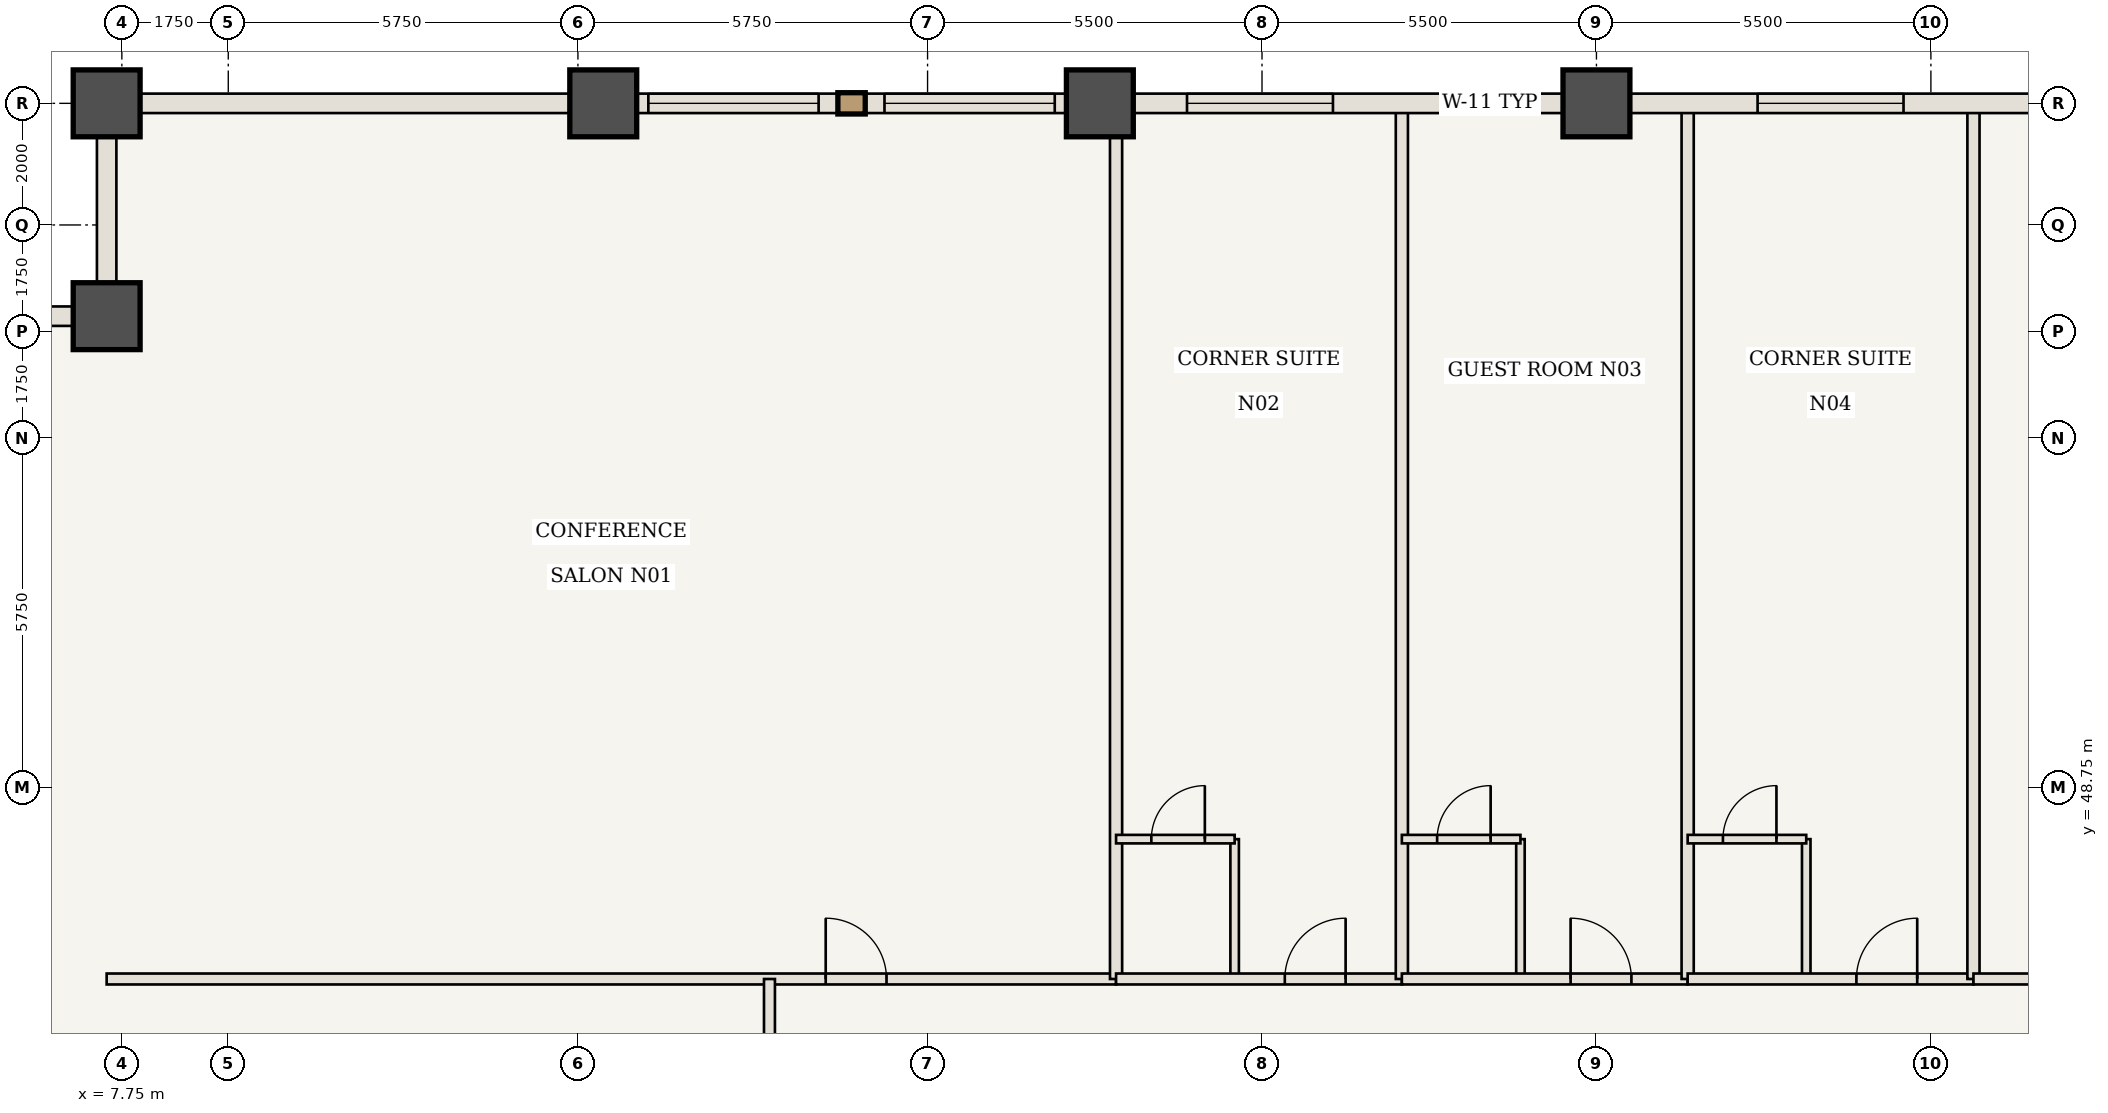
"""IFC4 building model, lengths in metres.
Left out: names, types, materials, properties, quantities, classifications, styles, units other than length and angle.
Written with IfcOpenShell. Run it as: python <this file> out.ifc"""

import sys

from ifc_helpers import new_model, si_unit, direction, frame, frame_2d, origin, origin_2d, place, context, subcontext, project, spatial, rectangle, extrude, element, fill, save


model = new_model("IFC4")
c1 = context("Model", 3, precision=1e-05, world=origin(), true_north=direction((0.0, 1.0)))
c2 = subcontext(c1, "Body", "Model", "MODEL_VIEW")
j1 = project(units=[si_unit("LENGTHUNIT", "METRE"), si_unit("PLANEANGLEUNIT", "RADIAN")], contexts=[c1])
p1 = place(None, origin())
s1 = spatial("IfcSite", under=j1, at=p1, CompositionType="ELEMENT")
p2 = place(p1, origin())
s2 = spatial("IfcBuilding", under=s1, at=p2, CompositionType="ELEMENT")
p3 = place(p2, frame((0.0, 0.0, 38.85)))
s3 = spatial("IfcBuildingStorey", under=s2, at=p3, CompositionType="ELEMENT", Elevation=38.85)
for number, where, z_axis, x_axis in (
    (1, (7.5, 60.0, 0.0), (0.0, 0.0, 1.0), (1.0, 0.0, 0.0)),
    (2, (7.5, 56.5, 0.0), (0.0, 0.0, 1.0), (1.0, 0.0, 0.0)),
    (3, (15.667, 60.0, 0.0), (0.0, 0.0, 1.0), (1.0, 0.0, 0.0)),
    (4, (23.833, 60.0, 0.0), (0.0, 0.0, 1.0), (1.0, 0.0, 0.0)),
    (5, (32.0, 60.0, 0.0), (0.0, 0.0, 1.0), (1.0, 0.0, 0.0)),
):
    element("IfcColumn", number, at=place(p3, frame(where, z_axis=z_axis, x_axis=x_axis)), inside=s3, PredefinedType="COLUMN", context=c2, shape_type="SweptSolid", body=[
        extrude(rectangle(XDim=1.1, YDim=1.1, at=origin_2d()), origin(), (0.0, 0.0, 1.0), 3.5),
    ])
p4 = place(p3, frame((7.5, 45.6, 0.0), z_axis=(0.0, 0.0, 1.0), x_axis=(1.0, 0.0, 0.0)))
e6 = element("IfcWall", 6, at=p4, inside=s3, PredefinedType="STANDARD", context=c2, shape_type="SweptSolid", body=[
    extrude(rectangle(XDim=16.6, YDim=0.18, at=frame_2d((8.3, 0.0))), origin(), (0.0, 0.0, 1.0), 3.08),
])
p5 = place(p4, frame((11.825, 0.0, 0.0)))
e7 = element("IfcOpeningElement", 7, at=p5, cuts=e6, PredefinedType="OPENING", context=c2, shape_type="SweptSolid", body=[
    extrude(rectangle(XDim=1.0, YDim=2.15, at=frame_2d((0.5, 1.075))), frame((0.0, 0.1, 0.0), z_axis=(0.0, -1.0, 0.0), x_axis=(1.0, 0.0, 0.0)), (0.0, 0.0, 1.0), 0.2),
])
p6 = place(p3, frame((24.1, 45.6, 0.0), z_axis=(0.0, 0.0, 1.0), x_axis=(0.0, 1.0, 0.0)))
e8 = element("IfcWall", 8, at=p6, inside=s3, PredefinedType="STANDARD", context=c2, shape_type="SweptSolid", body=[
    extrude(rectangle(XDim=14.34, YDim=0.2, at=frame_2d((7.17, 0.0))), origin(), (0.0, 0.0, 1.0), 3.08),
])
p7 = place(p3, frame((26.05, 45.6, 0.0), z_axis=(0.0, 0.0, 1.0), x_axis=(0.0, 1.0, 0.0)))
e9 = element("IfcWall", 9, at=p7, inside=s3, PredefinedType="STANDARD", context=c2, shape_type="SweptSolid", body=[
    extrude(rectangle(XDim=2.3, YDim=0.14, at=frame_2d((1.15, 0.0))), origin(), (0.0, 0.0, 1.0), 3.08),
])
p8 = place(p3, frame((24.1, 47.9, 0.0), z_axis=(0.0, 0.0, 1.0), x_axis=(1.0, 0.0, 0.0)))
e10 = element("IfcWall", 10, at=p8, inside=s3, PredefinedType="STANDARD", context=c2, shape_type="SweptSolid", body=[
    extrude(rectangle(XDim=1.95, YDim=0.14, at=frame_2d((0.975, 0.0))), origin(), (0.0, 0.0, 1.0), 3.08),
])
p9 = place(p8, frame((0.58, 0.0, 0.0)))
e11 = element("IfcOpeningElement", 11, at=p9, cuts=e10, PredefinedType="OPENING", context=c2, shape_type="SweptSolid", body=[
    extrude(rectangle(XDim=0.88, YDim=2.1, at=frame_2d((0.44, 1.05))), frame((0.0, 0.08, 0.0), z_axis=(0.0, -1.0, 0.0), x_axis=(1.0, 0.0, 0.0)), (0.0, 0.0, 1.0), 0.16),
])
p10 = place(p3, frame((24.1, 45.6, 0.0), z_axis=(0.0, 0.0, 1.0), x_axis=(1.0, 0.0, 0.0)))
e12 = element("IfcWall", 12, at=p10, inside=s3, PredefinedType="STANDARD", context=c2, shape_type="SweptSolid", body=[
    extrude(rectangle(XDim=4.7, YDim=0.18, at=frame_2d((2.35, 0.0))), origin(), (0.0, 0.0, 1.0), 3.08),
])
p11 = place(p10, frame((2.775, 0.0, 0.0)))
e13 = element("IfcOpeningElement", 13, at=p11, cuts=e12, PredefinedType="OPENING", context=c2, shape_type="SweptSolid", body=[
    extrude(rectangle(XDim=1.0, YDim=2.15, at=frame_2d((0.5, 1.075))), frame((0.0, 0.1, 0.0), z_axis=(0.0, -1.0, 0.0), x_axis=(1.0, 0.0, 0.0)), (0.0, 0.0, 1.0), 0.2),
])
p12 = place(p3, frame((28.8, 45.6, 0.0), z_axis=(0.0, 0.0, 1.0), x_axis=(0.0, 1.0, 0.0)))
e14 = element("IfcWall", 14, at=p12, inside=s3, PredefinedType="STANDARD", context=c2, shape_type="SweptSolid", body=[
    extrude(rectangle(XDim=14.34, YDim=0.2, at=frame_2d((7.17, 0.0))), origin(), (0.0, 0.0, 1.0), 3.08),
])
p13 = place(p3, frame((30.75, 45.6, 0.0), z_axis=(0.0, 0.0, 1.0), x_axis=(0.0, 1.0, 0.0)))
e15 = element("IfcWall", 15, at=p13, inside=s3, PredefinedType="STANDARD", context=c2, shape_type="SweptSolid", body=[
    extrude(rectangle(XDim=2.3, YDim=0.14, at=frame_2d((1.15, 0.0))), origin(), (0.0, 0.0, 1.0), 3.08),
])
p14 = place(p3, frame((28.8, 47.9, 0.0), z_axis=(0.0, 0.0, 1.0), x_axis=(1.0, 0.0, 0.0)))
e16 = element("IfcWall", 16, at=p14, inside=s3, PredefinedType="STANDARD", context=c2, shape_type="SweptSolid", body=[
    extrude(rectangle(XDim=1.95, YDim=0.14, at=frame_2d((0.975, 0.0))), origin(), (0.0, 0.0, 1.0), 3.08),
])
p15 = place(p14, frame((0.58, 0.0, 0.0)))
e17 = element("IfcOpeningElement", 17, at=p15, cuts=e16, PredefinedType="OPENING", context=c2, shape_type="SweptSolid", body=[
    extrude(rectangle(XDim=0.88, YDim=2.1, at=frame_2d((0.44, 1.05))), frame((0.0, 0.08, 0.0), z_axis=(0.0, -1.0, 0.0), x_axis=(1.0, 0.0, 0.0)), (0.0, 0.0, 1.0), 0.16),
])
p16 = place(p3, frame((28.8, 45.6, 0.0), z_axis=(0.0, 0.0, 1.0), x_axis=(1.0, 0.0, 0.0)))
e18 = element("IfcWall", 18, at=p16, inside=s3, PredefinedType="STANDARD", context=c2, shape_type="SweptSolid", body=[
    extrude(rectangle(XDim=4.7, YDim=0.18, at=frame_2d((2.35, 0.0))), origin(), (0.0, 0.0, 1.0), 3.08),
])
p17 = place(p16, frame((2.775, 0.0, 0.0)))
e19 = element("IfcOpeningElement", 19, at=p17, cuts=e18, PredefinedType="OPENING", context=c2, shape_type="SweptSolid", body=[
    extrude(rectangle(XDim=1.0, YDim=2.15, at=frame_2d((0.5, 1.075))), frame((0.0, 0.1, 0.0), z_axis=(0.0, -1.0, 0.0), x_axis=(1.0, 0.0, 0.0)), (0.0, 0.0, 1.0), 0.2),
])
p18 = place(p3, frame((33.5, 45.6, 0.0), z_axis=(0.0, 0.0, 1.0), x_axis=(0.0, 1.0, 0.0)))
e20 = element("IfcWall", 20, at=p18, inside=s3, PredefinedType="STANDARD", context=c2, shape_type="SweptSolid", body=[
    extrude(rectangle(XDim=14.34, YDim=0.2, at=frame_2d((7.17, 0.0))), origin(), (0.0, 0.0, 1.0), 3.08),
])
p19 = place(p3, frame((35.45, 45.6, 0.0), z_axis=(0.0, 0.0, 1.0), x_axis=(0.0, 1.0, 0.0)))
e21 = element("IfcWall", 21, at=p19, inside=s3, PredefinedType="STANDARD", context=c2, shape_type="SweptSolid", body=[
    extrude(rectangle(XDim=2.3, YDim=0.14, at=frame_2d((1.15, 0.0))), origin(), (0.0, 0.0, 1.0), 3.08),
])
p20 = place(p3, frame((33.5, 47.9, 0.0), z_axis=(0.0, 0.0, 1.0), x_axis=(1.0, 0.0, 0.0)))
e22 = element("IfcWall", 22, at=p20, inside=s3, PredefinedType="STANDARD", context=c2, shape_type="SweptSolid", body=[
    extrude(rectangle(XDim=1.95, YDim=0.14, at=frame_2d((0.975, 0.0))), origin(), (0.0, 0.0, 1.0), 3.08),
])
p21 = place(p20, frame((0.58, 0.0, 0.0)))
e23 = element("IfcOpeningElement", 23, at=p21, cuts=e22, PredefinedType="OPENING", context=c2, shape_type="SweptSolid", body=[
    extrude(rectangle(XDim=0.88, YDim=2.1, at=frame_2d((0.44, 1.05))), frame((0.0, 0.08, 0.0), z_axis=(0.0, -1.0, 0.0), x_axis=(1.0, 0.0, 0.0)), (0.0, 0.0, 1.0), 0.16),
])
p22 = place(p3, frame((33.5, 45.6, 0.0), z_axis=(0.0, 0.0, 1.0), x_axis=(1.0, 0.0, 0.0)))
e24 = element("IfcWall", 24, at=p22, inside=s3, PredefinedType="STANDARD", context=c2, shape_type="SweptSolid", body=[
    extrude(rectangle(XDim=4.7, YDim=0.18, at=frame_2d((2.35, 0.0))), origin(), (0.0, 0.0, 1.0), 3.08),
])
p23 = place(p22, frame((2.775, 0.0, 0.0)))
e25 = element("IfcOpeningElement", 25, at=p23, cuts=e24, PredefinedType="OPENING", context=c2, shape_type="SweptSolid", body=[
    extrude(rectangle(XDim=1.0, YDim=2.15, at=frame_2d((0.5, 1.075))), frame((0.0, 0.1, 0.0), z_axis=(0.0, -1.0, 0.0), x_axis=(1.0, 0.0, 0.0)), (0.0, 0.0, 1.0), 0.2),
])
p24 = place(p3, frame((38.2, 45.6, 0.0), z_axis=(0.0, 0.0, 1.0), x_axis=(0.0, 1.0, 0.0)))
e26 = element("IfcWall", 26, at=p24, inside=s3, PredefinedType="STANDARD", context=c2, shape_type="SweptSolid", body=[
    extrude(rectangle(XDim=14.34, YDim=0.2, at=frame_2d((7.17, 0.0))), origin(), (0.0, 0.0, 1.0), 3.08),
])
p25 = place(p3, frame((38.2, 45.6, 0.0), z_axis=(0.0, 0.0, 1.0), x_axis=(1.0, 0.0, 0.0)))
e27 = element("IfcWall", 27, at=p25, inside=s3, PredefinedType="STANDARD", context=c2, shape_type="SweptSolid", body=[
    extrude(rectangle(XDim=18.3, YDim=0.18, at=frame_2d((9.15, 0.0))), origin(), (0.0, 0.0, 1.0), 3.08),
])
p26 = place(p25, frame((4.625, 0.0, 0.0)))
e28 = element("IfcOpeningElement", 28, at=p26, cuts=e27, PredefinedType="OPENING", context=c2, shape_type="SweptSolid", body=[
    extrude(rectangle(XDim=1.0, YDim=2.15, at=frame_2d((0.5, 1.075))), frame((0.0, 0.1, 0.0), z_axis=(0.0, -1.0, 0.0), x_axis=(1.0, 0.0, 0.0)), (0.0, 0.0, 1.0), 0.2),
])
p27 = place(p3, frame((18.4, 41.9, 0.0), z_axis=(0.0, 0.0, 1.0), x_axis=(0.0, 1.0, 0.0)))
e29 = element("IfcWall", 29, at=p27, inside=s3, PredefinedType="STANDARD", context=c2, shape_type="SweptSolid", body=[
    extrude(rectangle(XDim=3.7, YDim=0.18, at=frame_2d((1.85, 0.0))), origin(), (0.0, 0.0, 1.0), 3.08),
])
p28 = place(p27, frame((1.35, 0.0, 0.0)))
e30 = element("IfcOpeningElement", 30, at=p28, cuts=e29, PredefinedType="OPENING", context=c2, shape_type="SweptSolid", body=[
    extrude(rectangle(XDim=1.0, YDim=2.15, at=frame_2d((0.5, 1.075))), frame((0.0, 0.1, 0.0), z_axis=(0.0, -1.0, 0.0), x_axis=(1.0, 0.0, 0.0)), (0.0, 0.0, 1.0), 0.2),
])
p29 = place(p3, frame((7.5, 60.0, 0.0), z_axis=(0.0, 0.0, 1.0), x_axis=(1.0, 0.0, 0.0)))
e31 = element("IfcWall", 31, at=p29, inside=s3, PredefinedType="USERDEFINED", context=c2, shape_type="SweptSolid", body=[
    extrude(rectangle(XDim=8.167, YDim=0.32, at=frame_2d((4.083, 0.0))), origin(), (0.0, 0.0, 1.0), 2.28),
])
p30 = place(p3, frame((15.667, 60.0, 0.0), z_axis=(0.0, 0.0, 1.0), x_axis=(1.0, 0.0, 0.0)))
e32 = element("IfcWall", 32, at=p30, inside=s3, PredefinedType="USERDEFINED", context=c2, shape_type="SweptSolid", body=[
    extrude(rectangle(XDim=8.167, YDim=0.32, at=frame_2d((4.083, 0.0))), origin(), (0.0, 0.0, 1.0), 2.28),
])
p31 = place(p30, frame((0.742, 0.0, 0.85)))
e33 = element("IfcOpeningElement", 33, at=p31, cuts=e32, PredefinedType="OPENING", context=c2, shape_type="SweptSolid", body=[
    extrude(rectangle(XDim=2.8, YDim=1.23, at=frame_2d((1.4, 0.615))), frame((0.0, 0.17, 0.0), z_axis=(0.0, -1.0, 0.0), x_axis=(1.0, 0.0, 0.0)), (0.0, 0.0, 1.0), 0.34),
])
p32 = place(p30, frame((4.625, 0.0, 0.85)))
e34 = element("IfcOpeningElement", 34, at=p32, cuts=e32, PredefinedType="OPENING", context=c2, shape_type="SweptSolid", body=[
    extrude(rectangle(XDim=2.8, YDim=1.23, at=frame_2d((1.4, 0.615))), frame((0.0, 0.17, 0.0), z_axis=(0.0, -1.0, 0.0), x_axis=(1.0, 0.0, 0.0)), (0.0, 0.0, 1.0), 0.34),
])
p33 = place(p3, frame((23.833, 60.0, 0.0), z_axis=(0.0, 0.0, 1.0), x_axis=(1.0, 0.0, 0.0)))
e35 = element("IfcWall", 35, at=p33, inside=s3, PredefinedType="USERDEFINED", context=c2, shape_type="SweptSolid", body=[
    extrude(rectangle(XDim=8.167, YDim=0.32, at=frame_2d((4.083, 0.0))), origin(), (0.0, 0.0, 1.0), 2.28),
])
p34 = place(p33, frame((1.433, 0.0, 0.85)))
e36 = element("IfcOpeningElement", 36, at=p34, cuts=e35, PredefinedType="OPENING", context=c2, shape_type="SweptSolid", body=[
    extrude(rectangle(XDim=2.4, YDim=1.23, at=frame_2d((1.2, 0.615))), frame((0.0, 0.17, 0.0), z_axis=(0.0, -1.0, 0.0), x_axis=(1.0, 0.0, 0.0)), (0.0, 0.0, 1.0), 0.34),
])
p35 = place(p33, frame((5.617, 0.0, 0.85)))
e37 = element("IfcOpeningElement", 37, at=p35, cuts=e35, PredefinedType="OPENING", context=c2, shape_type="SweptSolid", body=[
    extrude(rectangle(XDim=1.6, YDim=1.23, at=frame_2d((0.8, 0.615))), frame((0.0, 0.17, 0.0), z_axis=(0.0, -1.0, 0.0), x_axis=(1.0, 0.0, 0.0)), (0.0, 0.0, 1.0), 0.34),
])
p36 = place(p3, frame((32.0, 60.0, 0.0), z_axis=(0.0, 0.0, 1.0), x_axis=(1.0, 0.0, 0.0)))
e38 = element("IfcWall", 38, at=p36, inside=s3, PredefinedType="USERDEFINED", context=c2, shape_type="SweptSolid", body=[
    extrude(rectangle(XDim=8.167, YDim=0.32, at=frame_2d((4.083, 0.0))), origin(), (0.0, 0.0, 1.0), 2.28),
])
p37 = place(p36, frame((2.65, 0.0, 0.85)))
e39 = element("IfcOpeningElement", 39, at=p37, cuts=e38, PredefinedType="OPENING", context=c2, shape_type="SweptSolid", body=[
    extrude(rectangle(XDim=2.4, YDim=1.23, at=frame_2d((1.2, 0.615))), frame((0.0, 0.17, 0.0), z_axis=(0.0, -1.0, 0.0), x_axis=(1.0, 0.0, 0.0)), (0.0, 0.0, 1.0), 0.34),
])
for number, where, z_axis, x_axis in (
    (40, (7.5, 56.5, 0.0), (0.0, 0.0, 1.0), (0.0, 1.0, 0.0)),
    (41, (4.0, 56.5, 0.0), (0.0, 0.0, 1.0), (1.0, 0.0, 0.0)),
):
    element("IfcWall", number, at=place(p3, frame(where, z_axis=z_axis, x_axis=x_axis)), inside=s3, PredefinedType="USERDEFINED", context=c2, shape_type="SweptSolid", body=[
        extrude(rectangle(XDim=3.5, YDim=0.32, at=frame_2d((1.75, 0.0))), origin(), (0.0, 0.0, 1.0), 2.28),
    ])
p38 = place(p5, origin())
e42 = element("IfcDoor", 42, at=p38, inside=s3, OperationType="SINGLE_SWING_LEFT", PredefinedType="DOOR", context=c2, shape_type="SweptSolid", body=[
    extrude(rectangle(XDim=1.0, YDim=2.15, at=frame_2d((0.5, 1.075))), frame((0.0, 0.025, 0.0), z_axis=(0.0, -1.0, 0.0), x_axis=(1.0, 0.0, 0.0)), (0.0, 0.0, 1.0), 0.05),
])
fill(e7, e42)
p39 = place(p9, origin())
e43 = element("IfcDoor", 43, at=p39, inside=s3, OperationType="SINGLE_SWING_RIGHT", PredefinedType="DOOR", context=c2, shape_type="SweptSolid", body=[
    extrude(rectangle(XDim=0.88, YDim=2.1, at=frame_2d((0.44, 1.05))), frame((0.0, 0.025, 0.0), z_axis=(0.0, -1.0, 0.0), x_axis=(1.0, 0.0, 0.0)), (0.0, 0.0, 1.0), 0.05),
])
fill(e11, e43)
p40 = place(p11, origin())
e44 = element("IfcDoor", 44, at=p40, inside=s3, OperationType="SINGLE_SWING_RIGHT", PredefinedType="DOOR", context=c2, shape_type="SweptSolid", body=[
    extrude(rectangle(XDim=1.0, YDim=2.15, at=frame_2d((0.5, 1.075))), frame((0.0, 0.025, 0.0), z_axis=(0.0, -1.0, 0.0), x_axis=(1.0, 0.0, 0.0)), (0.0, 0.0, 1.0), 0.05),
])
fill(e13, e44)
p41 = place(p15, origin())
e45 = element("IfcDoor", 45, at=p41, inside=s3, OperationType="SINGLE_SWING_RIGHT", PredefinedType="DOOR", context=c2, shape_type="SweptSolid", body=[
    extrude(rectangle(XDim=0.88, YDim=2.1, at=frame_2d((0.44, 1.05))), frame((0.0, 0.025, 0.0), z_axis=(0.0, -1.0, 0.0), x_axis=(1.0, 0.0, 0.0)), (0.0, 0.0, 1.0), 0.05),
])
fill(e17, e45)
p42 = place(p17, origin())
e46 = element("IfcDoor", 46, at=p42, inside=s3, OperationType="SINGLE_SWING_LEFT", PredefinedType="DOOR", context=c2, shape_type="SweptSolid", body=[
    extrude(rectangle(XDim=1.0, YDim=2.15, at=frame_2d((0.5, 1.075))), frame((0.0, 0.025, 0.0), z_axis=(0.0, -1.0, 0.0), x_axis=(1.0, 0.0, 0.0)), (0.0, 0.0, 1.0), 0.05),
])
fill(e19, e46)
p43 = place(p21, origin())
e47 = element("IfcDoor", 47, at=p43, inside=s3, OperationType="SINGLE_SWING_RIGHT", PredefinedType="DOOR", context=c2, shape_type="SweptSolid", body=[
    extrude(rectangle(XDim=0.88, YDim=2.1, at=frame_2d((0.44, 1.05))), frame((0.0, 0.025, 0.0), z_axis=(0.0, -1.0, 0.0), x_axis=(1.0, 0.0, 0.0)), (0.0, 0.0, 1.0), 0.05),
])
fill(e23, e47)
p44 = place(p23, origin())
e48 = element("IfcDoor", 48, at=p44, inside=s3, OperationType="SINGLE_SWING_RIGHT", PredefinedType="DOOR", context=c2, shape_type="SweptSolid", body=[
    extrude(rectangle(XDim=1.0, YDim=2.15, at=frame_2d((0.5, 1.075))), frame((0.0, 0.025, 0.0), z_axis=(0.0, -1.0, 0.0), x_axis=(1.0, 0.0, 0.0)), (0.0, 0.0, 1.0), 0.05),
])
fill(e25, e48)
p45 = place(p31, origin())
e49 = element("IfcWindow", 49, at=p45, inside=s3, PartitioningType="SINGLE_PANEL", PredefinedType="WINDOW", context=c2, shape_type="SweptSolid", body=[
    extrude(rectangle(XDim=2.8, YDim=1.23, at=frame_2d((1.4, 0.615))), frame((0.0, 0.03, 0.0), z_axis=(0.0, -1.0, 0.0), x_axis=(1.0, 0.0, 0.0)), (0.0, 0.0, 1.0), 0.06),
])
fill(e33, e49)
p46 = place(p32, origin())
e50 = element("IfcWindow", 50, at=p46, inside=s3, PartitioningType="SINGLE_PANEL", PredefinedType="WINDOW", context=c2, shape_type="SweptSolid", body=[
    extrude(rectangle(XDim=2.8, YDim=1.23, at=frame_2d((1.4, 0.615))), frame((0.0, 0.03, 0.0), z_axis=(0.0, -1.0, 0.0), x_axis=(1.0, 0.0, 0.0)), (0.0, 0.0, 1.0), 0.06),
])
fill(e34, e50)
p47 = place(p34, origin())
e51 = element("IfcWindow", 51, at=p47, inside=s3, PartitioningType="SINGLE_PANEL", PredefinedType="WINDOW", context=c2, shape_type="SweptSolid", body=[
    extrude(rectangle(XDim=2.4, YDim=1.23, at=frame_2d((1.2, 0.615))), frame((0.0, 0.03, 0.0), z_axis=(0.0, -1.0, 0.0), x_axis=(1.0, 0.0, 0.0)), (0.0, 0.0, 1.0), 0.06),
])
fill(e36, e51)
p48 = place(p35, origin())
e52 = element("IfcWindow", 52, at=p48, inside=s3, PartitioningType="SINGLE_PANEL", PredefinedType="WINDOW", context=c2, shape_type="SweptSolid", body=[
    extrude(rectangle(XDim=1.6, YDim=1.23, at=frame_2d((0.8, 0.615))), frame((0.0, 0.03, 0.0), z_axis=(0.0, -1.0, 0.0), x_axis=(1.0, 0.0, 0.0)), (0.0, 0.0, 1.0), 0.06),
])
fill(e37, e52)
p49 = place(p37, origin())
e53 = element("IfcWindow", 53, at=p49, inside=s3, PartitioningType="SINGLE_PANEL", PredefinedType="WINDOW", context=c2, shape_type="SweptSolid", body=[
    extrude(rectangle(XDim=2.4, YDim=1.23, at=frame_2d((1.2, 0.615))), frame((0.0, 0.03, 0.0), z_axis=(0.0, -1.0, 0.0), x_axis=(1.0, 0.0, 0.0)), (0.0, 0.0, 1.0), 0.06),
])
fill(e39, e53)
save(model, sys.argv[1])
